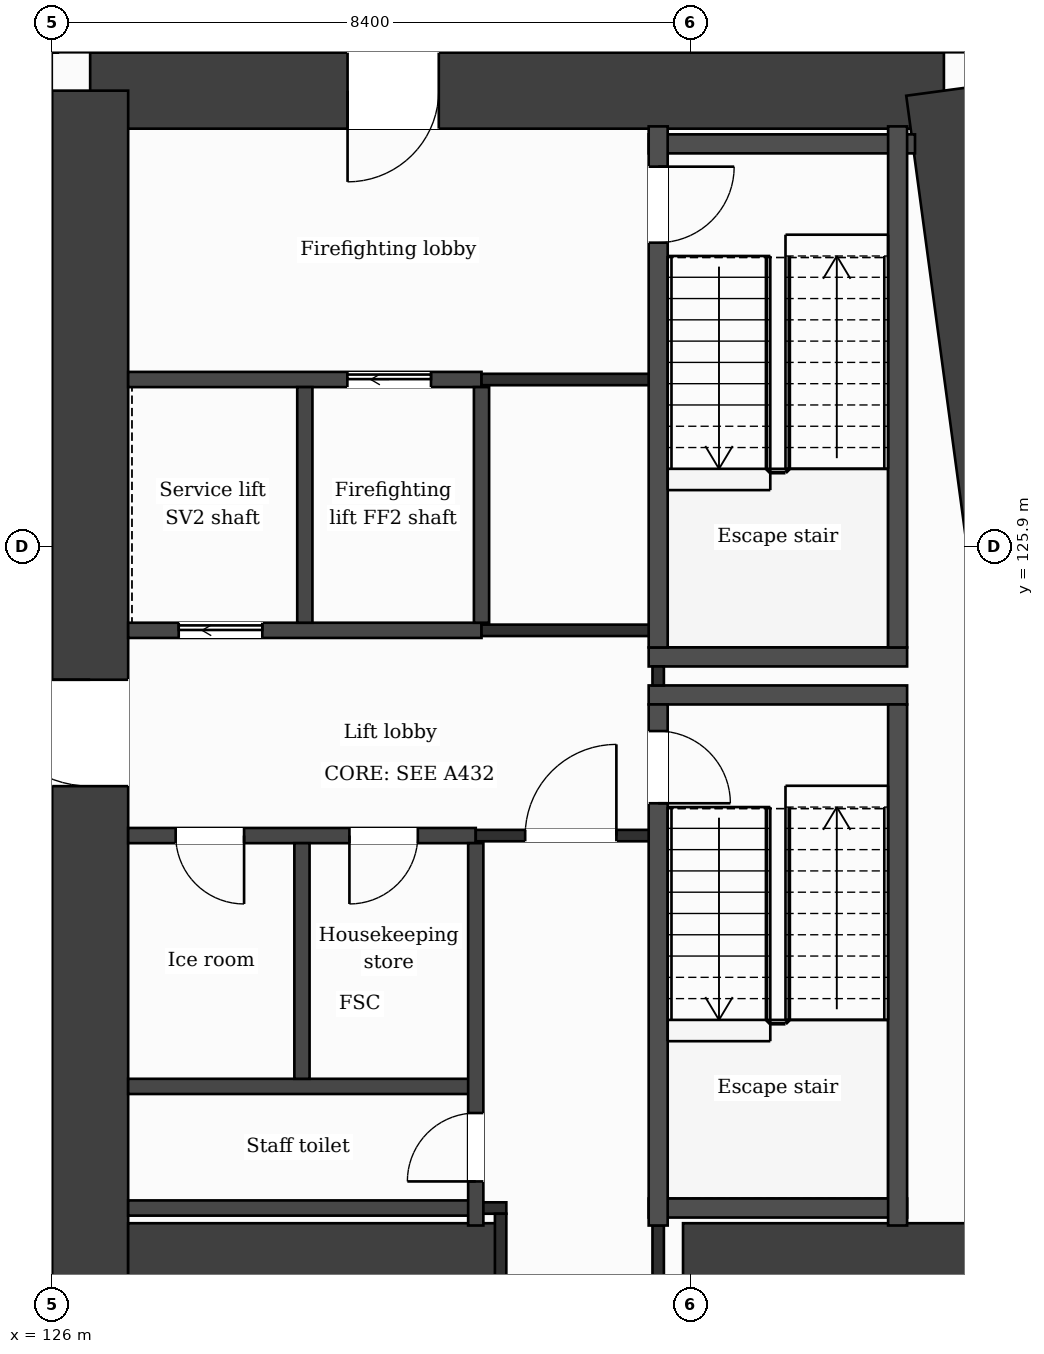
"""IFC4 building model, lengths in metres.
Left out: names, types, materials, properties, quantities, classifications, styles, units other than length and angle.
Written with IfcOpenShell. Run it as: python <this file> out.ifc"""

import sys

from ifc_helpers import new_model, si_unit, direction, frame, frame_2d, origin, place, context, subcontext, project, spatial, rectangle, extrude, element, fill, save


model = new_model("IFC4")
c1 = context("Model", 3, precision=1e-05, world=origin(), true_north=direction((0.0, 1.0)))
c2 = subcontext(c1, "Body", "Model", "MODEL_VIEW")
j1 = project(units=[si_unit("LENGTHUNIT", "METRE"), si_unit("PLANEANGLEUNIT", "RADIAN")], contexts=[c1])
p1 = place(None, origin())
s1 = spatial("IfcSite", under=j1, at=p1, CompositionType="ELEMENT")
p2 = place(p1, origin())
s2 = spatial("IfcBuilding", under=s1, at=p2, CompositionType="ELEMENT")
p3 = place(p2, frame((0.0, 0.0, 131.7)))
s3 = spatial("IfcBuildingStorey", under=s2, at=p3, CompositionType="ELEMENT", Elevation=131.7)
p4 = place(p3, frame((126.5, 131.9, 0.0), z_axis=(0.0, 0.0, 1.0), x_axis=(1.0, 0.0, 0.0)))
e1 = element("IfcWall", 1, at=p4, inside=s3, PredefinedType="SHEAR", context=c2, shape_type="SweptSolid", body=[
    extrude(rectangle(XDim=11.232, YDim=1.0, at=frame_2d((5.616, 0.0))), origin(), (0.0, 0.0, 1.0), 3.7),
])
p5 = place(p4, frame((3.386, 0.0, 0.0)))
e2 = element("IfcOpeningElement", 2, at=p5, cuts=e1, PredefinedType="OPENING", context=c2, shape_type="SweptSolid", body=[
    extrude(rectangle(XDim=1.2, YDim=2.1, at=frame_2d((0.6, 1.05))), frame((0.0, 0.51, 0.0), z_axis=(0.0, -1.0, 0.0), x_axis=(1.0, 0.0, 0.0)), (0.0, 0.0, 1.0), 1.02),
])
p6 = place(p3, frame((137.732, 131.9, 0.0), z_axis=(0.0, 0.0, 1.0), x_axis=(0.133411141623, -0.991060778808, 0.0)))
e3 = element("IfcWall", 3, at=p6, inside=s3, PredefinedType="SHEAR", context=c2, shape_type="SweptSolid", body=[
    extrude(rectangle(XDim=21.189, YDim=1.0, at=frame_2d((10.595, 0.0))), origin(), (0.0, 0.0, 1.0), 3.7),
])
p7 = place(p3, frame((126.5, 110.9, 0.0), z_axis=(0.0, 0.0, 1.0), x_axis=(0.0, 1.0, 0.0)))
e4 = element("IfcWall", 4, at=p7, inside=s3, PredefinedType="SHEAR", context=c2, shape_type="SweptSolid", body=[
    extrude(rectangle(XDim=21.0, YDim=1.0, at=frame_2d((10.5, 0.0))), origin(), (0.0, 0.0, 1.0), 3.7),
])
p8 = place(p7, frame((11.85, 0.0, 0.0)))
e5 = element("IfcOpeningElement", 5, at=p8, cuts=e4, PredefinedType="OPENING", context=c2, shape_type="SweptSolid", body=[
    extrude(rectangle(XDim=1.4, YDim=2.1, at=frame_2d((0.7, 1.05))), frame((0.0, 0.51, 0.0), z_axis=(0.0, -1.0, 0.0), x_axis=(1.0, 0.0, 0.0)), (0.0, 0.0, 1.0), 1.02),
])
p9 = place(p3, frame((127.0, 116.5, 0.0), z_axis=(0.0, 0.0, 1.0), x_axis=(1.0, 0.0, 0.0)))
e6 = element("IfcWall", 6, at=p9, inside=s3, PredefinedType="SHEAR", context=c2, shape_type="SweptSolid", body=[
    extrude(rectangle(XDim=4.9, YDim=1.0, at=frame_2d((2.45, 0.0))), origin(), (0.0, 0.0, 1.0), 3.7),
])
p10 = place(p3, frame((134.3, 116.5, 0.0), z_axis=(0.0, 0.0, 1.0), x_axis=(1.0, 0.0, 0.0)))
e7 = element("IfcWall", 7, at=p10, inside=s3, PredefinedType="SHEAR", context=c2, shape_type="SweptSolid", body=[
    extrude(rectangle(XDim=5.077, YDim=1.0, at=frame_2d((2.539, 0.0))), origin(), (0.0, 0.0, 1.0), 3.7),
])
p11 = place(p3, frame((136.504, 132.4, 0.0), z_axis=(0.0, 0.0, 1.0), x_axis=(-0.133399697462, 0.99106231929, 0.0)))
e8 = element("IfcWall", 8, at=p11, inside=s3, PredefinedType="SOLIDWALL", context=c2, shape_type="SweptSolid", body=[
    extrude(rectangle(XDim=6.74, YDim=0.3, at=frame_2d((3.37, 0.0))), origin(), (0.0, 0.0, 1.0), 3.2),
])
p12 = place(p11, frame((1.115, 0.0, 0.0)))
e9 = element("IfcOpeningElement", 9, at=p12, cuts=e8, PredefinedType="OPENING", context=c2, shape_type="SweptSolid", body=[
    extrude(rectangle(XDim=1.2, YDim=2.4, at=frame_2d((0.6, 1.2))), frame((0.0, 0.16, 0.0), z_axis=(0.0, -1.0, 0.0), x_axis=(1.0, 0.0, 0.0)), (0.0, 0.0, 1.0), 0.32),
])
p13 = place(p11, frame((3.835, 0.0, 0.9)))
e10 = element("IfcOpeningElement", 10, at=p13, cuts=e8, PredefinedType="OPENING", context=c2, shape_type="SweptSolid", body=[
    extrude(rectangle(XDim=2.4, YDim=2.1, at=frame_2d((1.2, 1.05))), frame((0.0, 0.16, 0.0), z_axis=(0.0, -1.0, 0.0), x_axis=(1.0, 0.0, 0.0)), (0.0, 0.0, 1.0), 0.32),
])
p14 = place(p3, frame((127.0, 117.2, 0.0), z_axis=(0.0, 0.0, 1.0), x_axis=(1.0, 0.0, 0.0)))
e11 = element("IfcWall", 11, at=p14, inside=s3, PredefinedType="PARTITIONING", context=c2, shape_type="SweptSolid", body=[
    extrude(rectangle(XDim=4.573, YDim=0.2, at=frame_2d((2.287, 0.0))), origin(), (0.0, 0.0, 1.0), 3.2),
])
p15 = place(p3, frame((131.573, 117.2, 0.0), z_axis=(0.0, 0.0, 1.0), x_axis=(1.0, 0.0, 0.0)))
e12 = element("IfcWall", 12, at=p15, inside=s3, PredefinedType="PARTITIONING", context=c2, shape_type="SweptSolid", body=[
    extrude(rectangle(XDim=0.402, YDim=0.15, at=frame_2d((0.201, 0.0))), origin(), (0.0, 0.0, 1.0), 3.2),
])
p16 = place(p3, frame((133.848, 117.2, 0.0), z_axis=(0.0, 0.0, 1.0), x_axis=(1.0, 0.0, 0.0)))
e13 = element("IfcWall", 13, at=p16, inside=s3, PredefinedType="PARTITIONING", context=c2, shape_type="SweptSolid", body=[
    extrude(rectangle(XDim=3.4, YDim=0.25, at=frame_2d((1.7, 0.0))), origin(), (0.0, 0.0, 1.0), 3.2),
])
p17 = place(p3, frame((127.0, 118.8, 0.0), z_axis=(0.0, 0.0, 1.0), x_axis=(1.0, 0.0, 0.0)))
e14 = element("IfcWall", 14, at=p17, inside=s3, PredefinedType="PARTITIONING", context=c2, shape_type="SweptSolid", body=[
    extrude(rectangle(XDim=4.573, YDim=0.2, at=frame_2d((2.287, 0.0))), origin(), (0.0, 0.0, 1.0), 3.2),
])
p18 = place(p3, frame((127.0, 122.1, 0.0), z_axis=(0.0, 0.0, 1.0), x_axis=(1.0, 0.0, 0.0)))
e15 = element("IfcWall", 15, at=p18, inside=s3, PredefinedType="PARTITIONING", context=c2, shape_type="SweptSolid", body=[
    extrude(rectangle(XDim=4.573, YDim=0.2, at=frame_2d((2.287, 0.0))), origin(), (0.0, 0.0, 1.0), 3.2),
])
p19 = place(p18, frame((2.911, 0.0, 0.0)))
e16 = element("IfcOpeningElement", 16, at=p19, cuts=e15, PredefinedType="OPENING", context=c2, shape_type="SweptSolid", body=[
    extrude(rectangle(XDim=0.9, YDim=2.1, at=frame_2d((0.45, 1.05))), frame((0.0, 0.11, 0.0), z_axis=(0.0, -1.0, 0.0), x_axis=(1.0, 0.0, 0.0)), (0.0, 0.0, 1.0), 0.22),
])
p20 = place(p18, frame((0.625, 0.0, 0.0)))
e17 = element("IfcOpeningElement", 17, at=p20, cuts=e15, PredefinedType="OPENING", context=c2, shape_type="SweptSolid", body=[
    extrude(rectangle(XDim=0.9, YDim=2.1, at=frame_2d((0.45, 1.05))), frame((0.0, 0.11, 0.0), z_axis=(0.0, -1.0, 0.0), x_axis=(1.0, 0.0, 0.0)), (0.0, 0.0, 1.0), 0.22),
])
p21 = place(p3, frame((131.573, 122.1, 0.0), z_axis=(0.0, 0.0, 1.0), x_axis=(1.0, 0.0, 0.0)))
e18 = element("IfcWall", 18, at=p21, inside=s3, PredefinedType="PARTITIONING", context=c2, shape_type="SweptSolid", body=[
    extrude(rectangle(XDim=2.4, YDim=0.15, at=frame_2d((1.2, 0.0))), origin(), (0.0, 0.0, 1.0), 3.2),
])
p22 = place(p21, frame((0.65, 0.0, 0.0)))
e19 = element("IfcOpeningElement", 19, at=p22, cuts=e18, PredefinedType="OPENING", context=c2, shape_type="SweptSolid", body=[
    extrude(rectangle(XDim=1.2, YDim=2.1, at=frame_2d((0.6, 1.05))), frame((0.0, 0.085, 0.0), z_axis=(0.0, -1.0, 0.0), x_axis=(1.0, 0.0, 0.0)), (0.0, 0.0, 1.0), 0.17),
])
p23 = place(p3, frame((100.8, 122.45, 0.0), z_axis=(0.0, 0.0, 1.0), x_axis=(1.0, 0.0, 0.0)))
e20 = element("IfcWall", 20, at=p23, inside=s3, PredefinedType="PARTITIONING", context=c2, shape_type="SweptSolid", body=[
    extrude(rectangle(XDim=25.2, YDim=0.15, at=frame_2d((12.6, 0.0))), origin(), (0.0, 0.0, 1.0), 3.2),
])
for number, where, z_axis, x_axis in (
    (21, (133.848, 123.95, 0.0), (0.0, 0.0, 1.0), (1.0, 0.0, 0.0)),
    (22, (133.848, 124.45, 0.0), (0.0, 0.0, 1.0), (1.0, 0.0, 0.0)),
):
    element("IfcWall", number, at=place(p3, frame(where, z_axis=z_axis, x_axis=x_axis)), inside=s3, PredefinedType="PARTITIONING", context=c2, shape_type="SweptSolid", body=[
        extrude(rectangle(XDim=3.4, YDim=0.25, at=frame_2d((1.7, 0.0))), origin(), (0.0, 0.0, 1.0), 3.2),
    ])
p24 = place(p3, frame((100.8, 124.45, 0.0), z_axis=(0.0, 0.0, 1.0), x_axis=(1.0, 0.0, 0.0)))
e23 = element("IfcWall", 23, at=p24, inside=s3, PredefinedType="PARTITIONING", context=c2, shape_type="SweptSolid", body=[
    extrude(rectangle(XDim=25.2, YDim=0.15, at=frame_2d((12.6, 0.0))), origin(), (0.0, 0.0, 1.0), 3.2),
])
p25 = place(p24, frame((2.025, 0.0, 0.0)))
e24 = element("IfcOpeningElement", 24, at=p25, cuts=e23, PredefinedType="OPENING", context=c2, shape_type="SweptSolid", body=[
    extrude(rectangle(XDim=1.0, YDim=2.1, at=frame_2d((0.5, 1.05))), frame((0.0, 0.085, 0.0), z_axis=(0.0, -1.0, 0.0), x_axis=(1.0, 0.0, 0.0)), (0.0, 0.0, 1.0), 0.17),
])
p26 = place(p24, frame((12.1, 0.0, 0.0)))
e25 = element("IfcOpeningElement", 25, at=p26, cuts=e23, PredefinedType="OPENING", context=c2, shape_type="SweptSolid", body=[
    extrude(rectangle(XDim=1.0, YDim=2.1, at=frame_2d((0.5, 1.05))), frame((0.0, 0.085, 0.0), z_axis=(0.0, -1.0, 0.0), x_axis=(1.0, 0.0, 0.0)), (0.0, 0.0, 1.0), 0.17),
])
p27 = place(p24, frame((17.54, 0.0, 0.0)))
e26 = element("IfcOpeningElement", 26, at=p27, cuts=e23, PredefinedType="OPENING", context=c2, shape_type="SweptSolid", body=[
    extrude(rectangle(XDim=1.0, YDim=2.1, at=frame_2d((0.5, 1.05))), frame((0.0, 0.085, 0.0), z_axis=(0.0, -1.0, 0.0), x_axis=(1.0, 0.0, 0.0)), (0.0, 0.0, 1.0), 0.17),
])
p28 = place(p24, frame((22.85, 0.0, 0.0)))
e27 = element("IfcOpeningElement", 27, at=p28, cuts=e23, PredefinedType="OPENING", context=c2, shape_type="SweptSolid", body=[
    extrude(rectangle(XDim=1.0, YDim=2.1, at=frame_2d((0.5, 1.05))), frame((0.0, 0.085, 0.0), z_axis=(0.0, -1.0, 0.0), x_axis=(1.0, 0.0, 0.0)), (0.0, 0.0, 1.0), 0.17),
])
p29 = place(p3, frame((127.0, 124.8, 0.0), z_axis=(0.0, 0.0, 1.0), x_axis=(1.0, 0.0, 0.0)))
e28 = element("IfcWall", 28, at=p29, inside=s3, PredefinedType="PARTITIONING", context=c2, shape_type="SweptSolid", body=[
    extrude(rectangle(XDim=4.649, YDim=0.2, at=frame_2d((2.324, 0.0))), origin(), (0.0, 0.0, 1.0), 3.2),
])
p30 = place(p29, frame((0.665, 0.0, 0.0)))
e29 = element("IfcOpeningElement", 29, at=p30, cuts=e28, PredefinedType="OPENING", context=c2, shape_type="SweptSolid", body=[
    extrude(rectangle(XDim=1.1, YDim=2.1, at=frame_2d((0.55, 1.05))), frame((0.0, 0.11, 0.0), z_axis=(0.0, -1.0, 0.0), x_axis=(1.0, 0.0, 0.0)), (0.0, 0.0, 1.0), 0.22),
])
p31 = place(p3, frame((131.649, 124.8, 0.0), z_axis=(0.0, 0.0, 1.0), x_axis=(1.0, 0.0, 0.0)))
e30 = element("IfcWall", 30, at=p31, inside=s3, PredefinedType="PARTITIONING", context=c2, shape_type="SweptSolid", body=[
    extrude(rectangle(XDim=2.449, YDim=0.15, at=frame_2d((1.225, 0.0))), origin(), (0.0, 0.0, 1.0), 3.2),
])
p32 = place(p3, frame((127.0, 128.1, 0.0), z_axis=(0.0, 0.0, 1.0), x_axis=(1.0, 0.0, 0.0)))
e31 = element("IfcWall", 31, at=p32, inside=s3, PredefinedType="PARTITIONING", context=c2, shape_type="SweptSolid", body=[
    extrude(rectangle(XDim=4.649, YDim=0.2, at=frame_2d((2.324, 0.0))), origin(), (0.0, 0.0, 1.0), 3.2),
])
p33 = place(p32, frame((2.884, 0.0, 0.0)))
e32 = element("IfcOpeningElement", 32, at=p33, cuts=e31, PredefinedType="OPENING", context=c2, shape_type="SweptSolid", body=[
    extrude(rectangle(XDim=1.1, YDim=2.1, at=frame_2d((0.55, 1.05))), frame((0.0, 0.11, 0.0), z_axis=(0.0, -1.0, 0.0), x_axis=(1.0, 0.0, 0.0)), (0.0, 0.0, 1.0), 0.22),
])
p34 = place(p3, frame((131.649, 128.1, 0.0), z_axis=(0.0, 0.0, 1.0), x_axis=(1.0, 0.0, 0.0)))
e33 = element("IfcWall", 33, at=p34, inside=s3, PredefinedType="PARTITIONING", context=c2, shape_type="SweptSolid", body=[
    extrude(rectangle(XDim=2.324, YDim=0.15, at=frame_2d((1.162, 0.0))), origin(), (0.0, 0.0, 1.0), 3.2),
])
p35 = place(p3, frame((133.848, 131.2, 0.0), z_axis=(0.0, 0.0, 1.0), x_axis=(1.0, 0.0, 0.0)))
e34 = element("IfcWall", 34, at=p35, inside=s3, PredefinedType="PARTITIONING", context=c2, shape_type="SweptSolid", body=[
    extrude(rectangle(XDim=3.504, YDim=0.25, at=frame_2d((1.752, 0.0))), origin(), (0.0, 0.0, 1.0), 3.2),
])
for number, where, z_axis, x_axis in (
    (35, (129.287, 118.9, 0.0), (0.0, 0.0, 1.0), (0.0, 1.0, 0.0)),
    (36, (129.324, 124.9, 0.0), (0.0, 0.0, 1.0), (0.0, 1.0, 0.0)),
):
    element("IfcWall", number, at=place(p3, frame(where, z_axis=z_axis, x_axis=x_axis)), inside=s3, PredefinedType="PARTITIONING", context=c2, shape_type="SweptSolid", body=[
        extrude(rectangle(XDim=3.1, YDim=0.2, at=frame_2d((1.55, 0.0))), origin(), (0.0, 0.0, 1.0), 3.2),
    ])
p36 = place(p3, frame((131.573, 116.97, 0.0), z_axis=(0.0, 0.0, 1.0), x_axis=(0.0, 1.0, 0.0)))
e37 = element("IfcWall", 37, at=p36, inside=s3, PredefinedType="PARTITIONING", context=c2, shape_type="SweptSolid", body=[
    extrude(rectangle(XDim=5.03, YDim=0.2, at=frame_2d((2.515, 0.0))), origin(), (0.0, 0.0, 1.0), 3.2),
])
p37 = place(p36, frame((0.58, 0.0, 0.0)))
e38 = element("IfcOpeningElement", 38, at=p37, cuts=e37, PredefinedType="OPENING", context=c2, shape_type="SweptSolid", body=[
    extrude(rectangle(XDim=0.9, YDim=2.1, at=frame_2d((0.45, 1.05))), frame((0.0, 0.11, 0.0), z_axis=(0.0, -1.0, 0.0), x_axis=(1.0, 0.0, 0.0)), (0.0, 0.0, 1.0), 0.22),
])
p38 = place(p3, frame((131.649, 124.9, 0.0), z_axis=(0.0, 0.0, 1.0), x_axis=(0.0, 1.0, 0.0)))
e39 = element("IfcWall", 39, at=p38, inside=s3, PredefinedType="PARTITIONING", context=c2, shape_type="SweptSolid", body=[
    extrude(rectangle(XDim=3.1, YDim=0.2, at=frame_2d((1.55, 0.0))), origin(), (0.0, 0.0, 1.0), 3.2),
])
p39 = place(p3, frame((131.9, 116.0, 0.0), z_axis=(0.0, 0.0, 1.0), x_axis=(0.0, 1.0, 0.0)))
e40 = element("IfcWall", 40, at=p39, inside=s3, PredefinedType="PARTITIONING", context=c2, shape_type="SweptSolid", body=[
    extrude(rectangle(XDim=1.125, YDim=0.15, at=frame_2d((0.562, 0.0))), origin(), (0.0, 0.0, 1.0), 3.2),
])
p40 = place(p3, frame((133.973, 116.0, 0.0), z_axis=(0.0, 0.0, 1.0), x_axis=(0.0, 1.0, 0.0)))
e41 = element("IfcWall", 41, at=p40, inside=s3, PredefinedType="PARTITIONING", context=c2, shape_type="SweptSolid", body=[
    extrude(rectangle(XDim=0.97, YDim=0.15, at=frame_2d((0.485, 0.0))), origin(), (0.0, 0.0, 1.0), 3.2),
])
p41 = place(p3, frame((133.973, 124.075, 0.0), z_axis=(0.0, 0.0, 1.0), x_axis=(0.0, 1.0, 0.0)))
e42 = element("IfcWall", 42, at=p41, inside=s3, PredefinedType="PARTITIONING", context=c2, shape_type="SweptSolid", body=[
    extrude(rectangle(XDim=0.25, YDim=0.15, at=frame_2d((0.125, 0.0))), origin(), (0.0, 0.0, 1.0), 3.2),
])
p42 = place(p3, frame((133.973, 116.97, 0.0), z_axis=(0.0, 0.0, 1.0), x_axis=(0.0, 1.0, 0.0)))
e43 = element("IfcWall", 43, at=p42, inside=s3, PredefinedType="PARTITIONING", context=c2, shape_type="SweptSolid", body=[
    extrude(rectangle(XDim=6.855, YDim=0.25, at=frame_2d((3.427, 0.0))), origin(), (0.0, 0.0, 1.0), 3.2),
])
p43 = place(p42, frame((5.555, 0.0, 0.0)))
e44 = element("IfcOpeningElement", 44, at=p43, cuts=e43, PredefinedType="OPENING", context=c2, shape_type="SweptSolid", body=[
    extrude(rectangle(XDim=0.95, YDim=2.1, at=frame_2d((0.475, 1.05))), frame((0.0, 0.135, 0.0), z_axis=(0.0, -1.0, 0.0), x_axis=(1.0, 0.0, 0.0)), (0.0, 0.0, 1.0), 0.27),
])
p44 = place(p3, frame((133.973, 124.575, 0.0), z_axis=(0.0, 0.0, 1.0), x_axis=(0.0, 1.0, 0.0)))
e45 = element("IfcWall", 45, at=p44, inside=s3, PredefinedType="PARTITIONING", context=c2, shape_type="SweptSolid", body=[
    extrude(rectangle(XDim=6.855, YDim=0.25, at=frame_2d((3.427, 0.0))), origin(), (0.0, 0.0, 1.0), 3.2),
])
p45 = place(p44, frame((5.325, 0.0, 0.0)))
e46 = element("IfcOpeningElement", 46, at=p45, cuts=e45, PredefinedType="OPENING", context=c2, shape_type="SweptSolid", body=[
    extrude(rectangle(XDim=1.0, YDim=2.1, at=frame_2d((0.5, 1.05))), frame((0.0, 0.135, 0.0), z_axis=(0.0, -1.0, 0.0), x_axis=(1.0, 0.0, 0.0)), (0.0, 0.0, 1.0), 0.27),
])
for number, where, z_axis, x_axis in (
    (47, (137.123, 116.97, 0.0), (0.0, 0.0, 1.0), (0.0, 1.0, 0.0)),
    (48, (137.123, 124.575, 0.0), (0.0, 0.0, 1.0), (0.0, 1.0, 0.0)),
):
    element("IfcWall", number, at=place(p3, frame(where, z_axis=z_axis, x_axis=x_axis)), inside=s3, PredefinedType="PARTITIONING", context=c2, shape_type="SweptSolid", body=[
        extrude(rectangle(XDim=6.855, YDim=0.25, at=frame_2d((3.427, 0.0))), origin(), (0.0, 0.0, 1.0), 3.2),
    ])
p46 = place(p22, origin())
e49 = element("IfcDoor", 49, at=p46, inside=s3, OperationType="SINGLE_SWING_RIGHT", PredefinedType="DOOR", context=c2, shape_type="SweptSolid", body=[
    extrude(rectangle(XDim=1.2, YDim=2.1, at=frame_2d((0.6, 1.05))), frame((0.0, 0.025, 0.0), z_axis=(0.0, -1.0, 0.0), x_axis=(1.0, 0.0, 0.0)), (0.0, 0.0, 1.0), 0.05),
])
fill(e19, e49)
p47 = place(p33, origin())
e50 = element("IfcDoor", 50, at=p47, inside=s3, OperationType="SLIDING_TO_LEFT", PredefinedType="DOOR", context=c2, shape_type="SweptSolid", body=[
    extrude(rectangle(XDim=1.1, YDim=2.1, at=frame_2d((0.55, 1.05))), frame((0.0, 0.025, 0.0), z_axis=(0.0, -1.0, 0.0), x_axis=(1.0, 0.0, 0.0)), (0.0, 0.0, 1.0), 0.05),
])
fill(e32, e50)
p48 = place(p30, origin())
e51 = element("IfcDoor", 51, at=p48, inside=s3, OperationType="SLIDING_TO_LEFT", PredefinedType="DOOR", context=c2, shape_type="SweptSolid", body=[
    extrude(rectangle(XDim=1.1, YDim=2.1, at=frame_2d((0.55, 1.05))), frame((0.0, 0.025, 0.0), z_axis=(0.0, -1.0, 0.0), x_axis=(1.0, 0.0, 0.0)), (0.0, 0.0, 1.0), 0.05),
])
fill(e29, e51)
p49 = place(p19, origin())
e52 = element("IfcDoor", 52, at=p49, inside=s3, OperationType="SINGLE_SWING_LEFT", PredefinedType="DOOR", context=c2, shape_type="SweptSolid", body=[
    extrude(rectangle(XDim=0.9, YDim=2.1, at=frame_2d((0.45, 1.05))), frame((0.0, 0.025, 0.0), z_axis=(0.0, -1.0, 0.0), x_axis=(1.0, 0.0, 0.0)), (0.0, 0.0, 1.0), 0.05),
])
fill(e16, e52)
p50 = place(p20, origin())
e53 = element("IfcDoor", 53, at=p50, inside=s3, OperationType="SINGLE_SWING_RIGHT", PredefinedType="DOOR", context=c2, shape_type="SweptSolid", body=[
    extrude(rectangle(XDim=0.9, YDim=2.1, at=frame_2d((0.45, 1.05))), frame((0.0, 0.025, 0.0), z_axis=(0.0, -1.0, 0.0), x_axis=(1.0, 0.0, 0.0)), (0.0, 0.0, 1.0), 0.05),
])
fill(e17, e53)
p51 = place(p43, origin())
e54 = element("IfcDoor", 54, at=p51, inside=s3, OperationType="SINGLE_SWING_LEFT", PredefinedType="DOOR", context=c2, shape_type="SweptSolid", body=[
    extrude(rectangle(XDim=0.95, YDim=2.1, at=frame_2d((0.475, 1.05))), frame((0.0, 0.025, 0.0), z_axis=(0.0, -1.0, 0.0), x_axis=(1.0, 0.0, 0.0)), (0.0, 0.0, 1.0), 0.05),
])
fill(e44, e54)
p52 = place(p45, origin())
e55 = element("IfcDoor", 55, at=p52, inside=s3, OperationType="SINGLE_SWING_RIGHT", PredefinedType="DOOR", context=c2, shape_type="SweptSolid", body=[
    extrude(rectangle(XDim=1.0, YDim=2.1, at=frame_2d((0.5, 1.05))), frame((0.0, 0.025, 0.0), z_axis=(0.0, -1.0, 0.0), x_axis=(1.0, 0.0, 0.0)), (0.0, 0.0, 1.0), 0.05),
])
fill(e46, e55)
p53 = place(p37, origin())
e56 = element("IfcDoor", 56, at=p53, inside=s3, OperationType="SINGLE_SWING_LEFT", PredefinedType="DOOR", context=c2, shape_type="SweptSolid", body=[
    extrude(rectangle(XDim=0.9, YDim=2.1, at=frame_2d((0.45, 1.05))), frame((0.0, 0.025, 0.0), z_axis=(0.0, -1.0, 0.0), x_axis=(1.0, 0.0, 0.0)), (0.0, 0.0, 1.0), 0.05),
])
fill(e38, e56)
p54 = place(p5, origin())
e57 = element("IfcDoor", 57, at=p54, inside=s3, OperationType="SINGLE_SWING_LEFT", PredefinedType="DOOR", context=c2, shape_type="SweptSolid", body=[
    extrude(rectangle(XDim=1.2, YDim=2.1, at=frame_2d((0.6, 1.05))), frame((0.0, 0.025, 0.0), z_axis=(0.0, -1.0, 0.0), x_axis=(1.0, 0.0, 0.0)), (0.0, 0.0, 1.0), 0.05),
])
fill(e2, e57)
p55 = place(p8, origin())
e58 = element("IfcDoor", 58, at=p55, inside=s3, OperationType="SINGLE_SWING_RIGHT", PredefinedType="DOOR", context=c2, shape_type="SweptSolid", body=[
    extrude(rectangle(XDim=1.4, YDim=2.1, at=frame_2d((0.7, 1.05))), frame((0.0, 0.025, 0.0), z_axis=(0.0, -1.0, 0.0), x_axis=(1.0, 0.0, 0.0)), (0.0, 0.0, 1.0), 0.05),
])
fill(e5, e58)
save(model, sys.argv[1])
